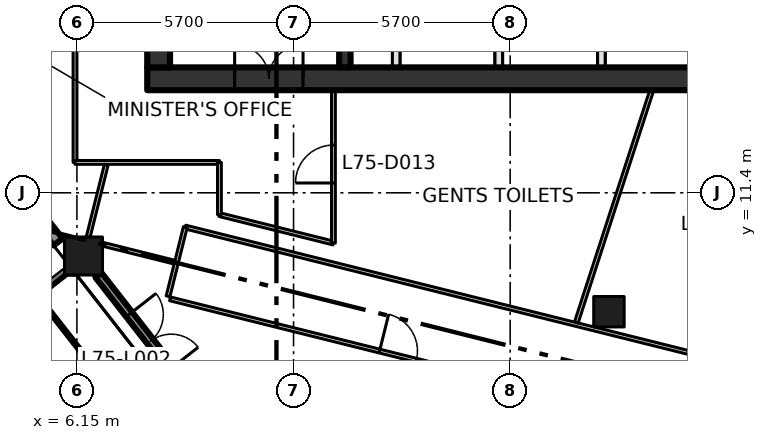
"""IFC4 building model, lengths in metres.
Left out: names, types, materials, properties, quantities, classifications, styles, units other than length and angle.
Written with IfcOpenShell. Run it as: python <this file> out.ifc"""

import sys

from ifc_helpers import new_model, si_unit, direction, frame, frame_2d, origin, origin_2d, place, context, subcontext, project, spatial, rectangle, extrude, element, fill, save


model = new_model("IFC4")
c1 = context("Model", 3, precision=1e-05, world=origin(), true_north=direction((0.0, 1.0)))
c2 = subcontext(c1, "Body", "Model", "MODEL_VIEW")
j1 = project(units=[si_unit("LENGTHUNIT", "METRE"), si_unit("PLANEANGLEUNIT", "RADIAN")], contexts=[c1])
p1 = place(None, origin())
s1 = spatial("IfcSite", under=j1, at=p1, CompositionType="ELEMENT")
p2 = place(p1, origin())
s2 = spatial("IfcBuilding", under=s1, at=p2, CompositionType="ELEMENT")
p3 = place(p2, frame((0.0, 0.0, 327.6)))
s3 = spatial("IfcBuildingStorey", under=s2, at=p3, CompositionType="ELEMENT", Elevation=327.6)
p4 = place(p3, frame((6.323, 9.737, 0.0), z_axis=(0.0, 0.0, 1.0), x_axis=(1.0, 0.0, 0.0)))
e1 = element("IfcColumn", 1, at=p4, inside=s3, PredefinedType="COLUMN", context=c2, shape_type="SweptSolid", body=[
    extrude(rectangle(XDim=1.0, YDim=1.0, at=origin_2d()), origin(), (0.0, 0.0, 1.0), 4.2),
])
p5 = place(p3, frame((20.149, 8.271, 0.0), z_axis=(0.0, 0.0, 1.0), x_axis=(1.0, 0.0, 0.0)))
e2 = element("IfcColumn", 2, at=p5, inside=s3, PredefinedType="COLUMN", context=c2, shape_type="SweptSolid", body=[
    extrude(rectangle(XDim=0.8, YDim=0.8, at=origin_2d()), origin(), (0.0, 0.0, 1.0), 4.2),
])
p6 = place(p3, frame((8.0, 14.4, -0.3), z_axis=(0.0, 0.0, 1.0), x_axis=(1.0, 0.0, 0.0)))
e3 = element("IfcWall", 3, at=p6, inside=s3, PredefinedType="SHEAR", context=c2, shape_type="SweptSolid", body=[
    extrude(rectangle(XDim=22.8, YDim=0.6, at=frame_2d((11.4, 0.0))), origin(), (0.0, 0.0, 1.0), 4.2),
])
p7 = place(p6, frame((2.3, 0.0, 0.3)))
e4 = element("IfcOpeningElement", 4, at=p7, cuts=e3, PredefinedType="OPENING", context=c2, shape_type="SweptSolid", body=[
    extrude(rectangle(XDim=1.8, YDim=2.1, at=frame_2d((0.9, 1.05))), frame((0.0, 0.31, 0.0), z_axis=(0.0, -1.0, 0.0), x_axis=(1.0, 0.0, 0.0)), (0.0, 0.0, 1.0), 0.62),
])
p8 = place(p3, frame((8.3, 14.7, -0.3), z_axis=(0.0, 0.0, 1.0), x_axis=(0.0, 1.0, 0.0)))
e5 = element("IfcWall", 5, at=p8, inside=s3, PredefinedType="SHEAR", context=c2, shape_type="SweptSolid", body=[
    extrude(rectangle(XDim=21.0, YDim=0.6, at=frame_2d((10.5, 0.0))), origin(), (0.0, 0.0, 1.0), 4.2),
])
p9 = place(p3, frame((13.2, 14.7, 0.0), z_axis=(0.0, 0.0, 1.0), x_axis=(0.0, 1.0, 0.0)))
e6 = element("IfcWall", 6, at=p9, inside=s3, PredefinedType="SHEAR", context=c2, shape_type="SweptSolid", body=[
    extrude(rectangle(XDim=21.0, YDim=0.3, at=frame_2d((10.5, 0.0))), origin(), (0.0, 0.0, 1.0), 3.9),
])
p10 = place(p9, frame((3.6, 0.0, 0.0)))
e7 = element("IfcOpeningElement", 7, at=p10, cuts=e6, PredefinedType="OPENING", context=c2, shape_type="SweptSolid", body=[
    extrude(rectangle(XDim=1.8, YDim=2.1, at=frame_2d((0.9, 1.05))), frame((0.0, 0.16, 0.0), z_axis=(0.0, -1.0, 0.0), x_axis=(1.0, 0.0, 0.0)), (0.0, 0.0, 1.0), 0.32),
])
p11 = place(p9, frame((11.7, 0.0, 0.0)))
e8 = element("IfcOpeningElement", 8, at=p11, cuts=e6, PredefinedType="OPENING", context=c2, shape_type="SweptSolid", body=[
    extrude(rectangle(XDim=1.2, YDim=2.1, at=frame_2d((0.6, 1.05))), frame((0.0, 0.16, 0.0), z_axis=(0.0, -1.0, 0.0), x_axis=(1.0, 0.0, 0.0)), (0.0, 0.0, 1.0), 0.32),
])
for number, where, z_axis, x_axis in (
    (9, (14.55, 14.7, 0.0), (0.0, 0.0, 1.0), (0.0, 1.0, 0.0)),
    (10, (17.25, 14.7, 0.0), (0.0, 0.0, 1.0), (0.0, 1.0, 0.0)),
    (11, (19.95, 14.7, 0.0), (0.0, 0.0, 1.0), (0.0, 1.0, 0.0)),
):
    element("IfcWall", number, at=place(p3, frame(where, z_axis=z_axis, x_axis=x_axis)), inside=s3, PredefinedType="SOLIDWALL", context=c2, shape_type="SweptSolid", body=[
        extrude(rectangle(XDim=2.9, YDim=0.2, at=frame_2d((1.45, 0.0))), origin(), (0.0, 0.0, 1.0), 3.9),
    ])
p12 = place(p3, frame((3.01, 13.491, 0.0), z_axis=(0.0, 0.0, 1.0), x_axis=(0.615713519567, -0.787970089421, 0.0)))
e12 = element("IfcWall", 12, at=p12, inside=s3, PredefinedType="SOLIDWALL", context=c2, shape_type="SweptSolid", body=[
    extrude(rectangle(XDim=4.296, YDim=0.3, at=frame_2d((2.148, 0.0))), origin(), (0.0, 0.0, 1.0), 3.2),
])
p13 = place(p12, frame((0.948, 0.0, 0.8)))
e13 = element("IfcOpeningElement", 13, at=p13, cuts=e12, PredefinedType="OPENING", context=c2, shape_type="SweptSolid", body=[
    extrude(rectangle(XDim=2.4, YDim=2.1, at=frame_2d((1.2, 1.05))), frame((0.0, 0.16, 0.0), z_axis=(0.0, -1.0, 0.0), x_axis=(1.0, 0.0, 0.0)), (0.0, 0.0, 1.0), 0.32),
])
p14 = place(p3, frame((6.715, 9.237, 0.0), z_axis=(0.0, 0.0, 1.0), x_axis=(0.615465445194, -0.788163869873, 0.0)))
e14 = element("IfcWall", 14, at=p14, inside=s3, PredefinedType="SOLIDWALL", context=c2, shape_type="SweptSolid", body=[
    extrude(rectangle(XDim=4.43, YDim=0.2, at=frame_2d((2.215, 0.0))), origin(), (0.0, 0.0, 1.0), 3.2),
])
p15 = place(p14, frame((1.315, 0.0, 0.0)))
e15 = element("IfcOpeningElement", 15, at=p15, cuts=e14, PredefinedType="OPENING", context=c2, shape_type="SweptSolid", body=[
    extrude(rectangle(XDim=1.8, YDim=2.9, at=frame_2d((0.9, 1.45))), frame((0.0, 0.11, 0.0), z_axis=(0.0, -1.0, 0.0), x_axis=(1.0, 0.0, 0.0)), (0.0, 0.0, 1.0), 0.22),
])
p16 = place(p3, frame((6.1, 12.2, 0.0), z_axis=(0.0, 0.0, 1.0), x_axis=(0.0, 1.0, 0.0)))
e16 = element("IfcWall", 16, at=p16, inside=s3, PredefinedType="PARTITIONING", context=c2, shape_type="SweptSolid", body=[
    extrude(rectangle(XDim=26.7, YDim=0.1, at=frame_2d((13.35, 0.0))), origin(), (0.0, 0.0, 1.0), 3.9),
])
p17 = place(p16, frame((4.48, 0.0, 0.0)))
e17 = element("IfcOpeningElement", 17, at=p17, cuts=e16, PredefinedType="OPENING", context=c2, shape_type="SweptSolid", body=[
    extrude(rectangle(XDim=1.0, YDim=2.1, at=frame_2d((0.5, 1.05))), frame((0.0, 0.06, 0.0), z_axis=(0.0, -1.0, 0.0), x_axis=(1.0, 0.0, 0.0)), (0.0, 0.0, 1.0), 0.12),
])
p18 = place(p16, frame((12.279, 0.0, 0.0)))
e18 = element("IfcOpeningElement", 18, at=p18, cuts=e16, PredefinedType="OPENING", context=c2, shape_type="SweptSolid", body=[
    extrude(rectangle(XDim=1.0, YDim=2.1, at=frame_2d((0.5, 1.05))), frame((0.0, 0.06, 0.0), z_axis=(0.0, -1.0, 0.0), x_axis=(1.0, 0.0, 0.0)), (0.0, 0.0, 1.0), 0.12),
])
p19 = place(p16, frame((20.979, 0.0, 0.0)))
e19 = element("IfcOpeningElement", 19, at=p19, cuts=e16, PredefinedType="OPENING", context=c2, shape_type="SweptSolid", body=[
    extrude(rectangle(XDim=1.0, YDim=2.1, at=frame_2d((0.5, 1.05))), frame((0.0, 0.06, 0.0), z_axis=(0.0, -1.0, 0.0), x_axis=(1.0, 0.0, 0.0)), (0.0, 0.0, 1.0), 0.12),
])
p20 = place(p3, frame((6.1, 12.2, 0.0), z_axis=(0.0, 0.0, 1.0), x_axis=(1.0, 0.0, 0.0)))
e20 = element("IfcWall", 20, at=p20, inside=s3, PredefinedType="PARTITIONING", context=c2, shape_type="SweptSolid", body=[
    extrude(rectangle(XDim=3.8, YDim=0.1, at=frame_2d((1.9, 0.0))), origin(), (0.0, 0.0, 1.0), 3.9),
])
p21 = place(p3, frame((8.601, 8.61, 0.0), z_axis=(0.0, 0.0, 1.0), x_axis=(0.970290921205, -0.241941166872, 0.0)))
e21 = element("IfcWall", 21, at=p21, inside=s3, PredefinedType="PARTITIONING", context=c2, shape_type="SweptSolid", body=[
    extrude(rectangle(XDim=19.812, YDim=0.1, at=frame_2d((9.906, 0.0))), origin(), (0.0, 0.0, 1.0), 3.9),
])
p22 = place(p21, frame((13.785, 0.0, 0.0)))
e22 = element("IfcOpeningElement", 22, at=p22, cuts=e21, PredefinedType="OPENING", context=c2, shape_type="SweptSolid", body=[
    extrude(rectangle(XDim=1.8, YDim=2.1, at=frame_2d((0.9, 1.05))), frame((0.0, 0.06, 0.0), z_axis=(0.0, -1.0, 0.0), x_axis=(1.0, 0.0, 0.0)), (0.0, 0.0, 1.0), 0.12),
])
p23 = place(p21, frame((5.68, 0.0, 0.0)))
e23 = element("IfcOpeningElement", 23, at=p23, cuts=e21, PredefinedType="OPENING", context=c2, shape_type="SweptSolid", body=[
    extrude(rectangle(XDim=1.0, YDim=2.1, at=frame_2d((0.5, 1.05))), frame((0.0, 0.06, 0.0), z_axis=(0.0, -1.0, 0.0), x_axis=(1.0, 0.0, 0.0)), (0.0, 0.0, 1.0), 0.12),
])
p24 = place(p3, frame((9.002, 10.499, 0.0), z_axis=(0.0, 0.0, 1.0), x_axis=(0.970298340477, -0.241911410372, 0.0)))
e24 = element("IfcWall", 24, at=p24, inside=s3, PredefinedType="PARTITIONING", context=c2, shape_type="SweptSolid", body=[
    extrude(rectangle(XDim=19.88, YDim=0.1, at=frame_2d((9.94, 0.0))), origin(), (0.0, 0.0, 1.0), 3.9),
])
p25 = place(p24, frame((14.766, 0.0, 0.0)))
e25 = element("IfcOpeningElement", 25, at=p25, cuts=e24, PredefinedType="OPENING", context=c2, shape_type="SweptSolid", body=[
    extrude(rectangle(XDim=1.0, YDim=2.1, at=frame_2d((0.5, 1.05))), frame((0.0, 0.06, 0.0), z_axis=(0.0, -1.0, 0.0), x_axis=(1.0, 0.0, 0.0)), (0.0, 0.0, 1.0), 0.12),
])
p26 = place(p3, frame((9.002, 10.499, 0.0), z_axis=(0.0, 0.0, 1.0), x_axis=(-0.241709519716, -0.970348652845, 0.0)))
e26 = element("IfcWall", 26, at=p26, inside=s3, PredefinedType="PARTITIONING", context=c2, shape_type="SweptSolid", body=[
    extrude(rectangle(XDim=1.878, YDim=0.1, at=frame_2d((0.939, 0.0))), origin(), (0.0, 0.0, 1.0), 3.9),
])
p27 = place(p3, frame((9.9, 10.826, 0.0), z_axis=(0.0, 0.0, 1.0), x_axis=(0.970290953223, -0.241941038466, 0.0)))
e27 = element("IfcWall", 27, at=p27, inside=s3, PredefinedType="PARTITIONING", context=c2, shape_type="SweptSolid", body=[
    extrude(rectangle(XDim=3.092, YDim=0.1, at=frame_2d((1.546, 0.0))), origin(), (0.0, 0.0, 1.0), 3.9),
])
p28 = place(p3, frame((9.9, 12.2, 0.0), z_axis=(0.0, 0.0, 1.0), x_axis=(0.0, -1.0, 0.0)))
e28 = element("IfcWall", 28, at=p28, inside=s3, PredefinedType="PARTITIONING", context=c2, shape_type="SweptSolid", body=[
    extrude(rectangle(XDim=1.374, YDim=0.1, at=frame_2d((0.687, 0.0))), origin(), (0.0, 0.0, 1.0), 3.9),
])
p29 = place(p3, frame((12.9, 10.078, 0.0), z_axis=(0.0, 0.0, 1.0), x_axis=(0.0, 1.0, 0.0)))
e29 = element("IfcWall", 29, at=p29, inside=s3, PredefinedType="PARTITIONING", context=c2, shape_type="SweptSolid", body=[
    extrude(rectangle(XDim=4.022, YDim=0.1, at=frame_2d((2.011, 0.0))), origin(), (0.0, 0.0, 1.0), 3.9),
])
p30 = place(p29, frame((1.58, 0.0, 0.0)))
e30 = element("IfcOpeningElement", 30, at=p30, cuts=e29, PredefinedType="OPENING", context=c2, shape_type="SweptSolid", body=[
    extrude(rectangle(XDim=1.0, YDim=2.1, at=frame_2d((0.5, 1.05))), frame((0.0, 0.06, 0.0), z_axis=(0.0, -1.0, 0.0), x_axis=(1.0, 0.0, 0.0)), (0.0, 0.0, 1.0), 0.12),
])
p31 = place(p3, frame((6.922, 12.138, 0.0), z_axis=(0.0, 0.0, 1.0), x_axis=(-0.242476987996, -0.970157157523, 0.0)))
e31 = element("IfcWall", 31, at=p31, inside=s3, PredefinedType="PARTITIONING", context=c2, shape_type="SweptSolid", body=[
    extrude(rectangle(XDim=1.959, YDim=0.1, at=frame_2d((0.98, 0.0))), origin(), (0.0, 0.0, 1.0), 3.9),
])
p32 = place(p3, frame((8.72, 9.575, 0.0), z_axis=(0.0, 0.0, 1.0), x_axis=(-0.970274576003, 0.242006708918, 0.0)))
e32 = element("IfcWall", 32, at=p32, inside=s3, PredefinedType="PARTITIONING", context=c2, shape_type="SweptSolid", body=[
    extrude(rectangle(XDim=1.955, YDim=0.1, at=frame_2d((0.978, 0.0))), origin(), (0.0, 0.0, 1.0), 3.9),
])
p33 = place(p3, frame((19.291, 7.989, 0.0), z_axis=(0.0, 0.0, 1.0), x_axis=(0.308911656913, 0.951090736062, 0.0)))
e33 = element("IfcWall", 33, at=p33, inside=s3, PredefinedType="PARTITIONING", context=c2, shape_type="SweptSolid", body=[
    extrude(rectangle(XDim=6.425, YDim=0.1, at=frame_2d((3.213, 0.0))), origin(), (0.0, 0.0, 1.0), 3.9),
])
p34 = place(p7, origin())
e34 = element("IfcDoor", 34, at=p34, inside=s3, OperationType="DOUBLE_DOOR_SINGLE_SWING", PredefinedType="DOOR", context=c2, shape_type="SweptSolid", body=[
    extrude(rectangle(XDim=1.8, YDim=2.1, at=frame_2d((0.9, 1.05))), frame((0.0, 0.025, 0.0), z_axis=(0.0, -1.0, 0.0), x_axis=(1.0, 0.0, 0.0)), (0.0, 0.0, 1.0), 0.05),
])
fill(e4, e34)
p35 = place(p15, origin())
e35 = element("IfcDoor", 35, at=p35, inside=s3, OperationType="DOUBLE_DOOR_SINGLE_SWING", PredefinedType="DOOR", context=c2, shape_type="SweptSolid", body=[
    extrude(rectangle(XDim=1.8, YDim=2.9, at=frame_2d((0.9, 1.45))), frame((0.0, 0.025, 0.0), z_axis=(0.0, -1.0, 0.0), x_axis=(1.0, 0.0, 0.0)), (0.0, 0.0, 1.0), 0.05),
])
fill(e15, e35)
p36 = place(p23, origin())
e36 = element("IfcDoor", 36, at=p36, inside=s3, OperationType="SINGLE_SWING_LEFT", PredefinedType="DOOR", context=c2, shape_type="SweptSolid", body=[
    extrude(rectangle(XDim=1.0, YDim=2.1, at=frame_2d((0.5, 1.05))), frame((0.0, 0.025, 0.0), z_axis=(0.0, -1.0, 0.0), x_axis=(1.0, 0.0, 0.0)), (0.0, 0.0, 1.0), 0.05),
])
fill(e23, e36)
p37 = place(p30, origin())
e37 = element("IfcDoor", 37, at=p37, inside=s3, OperationType="SINGLE_SWING_LEFT", PredefinedType="DOOR", context=c2, shape_type="SweptSolid", body=[
    extrude(rectangle(XDim=1.0, YDim=2.1, at=frame_2d((0.5, 1.05))), frame((0.0, 0.025, 0.0), z_axis=(0.0, -1.0, 0.0), x_axis=(1.0, 0.0, 0.0)), (0.0, 0.0, 1.0), 0.05),
])
fill(e30, e37)
save(model, sys.argv[1])
